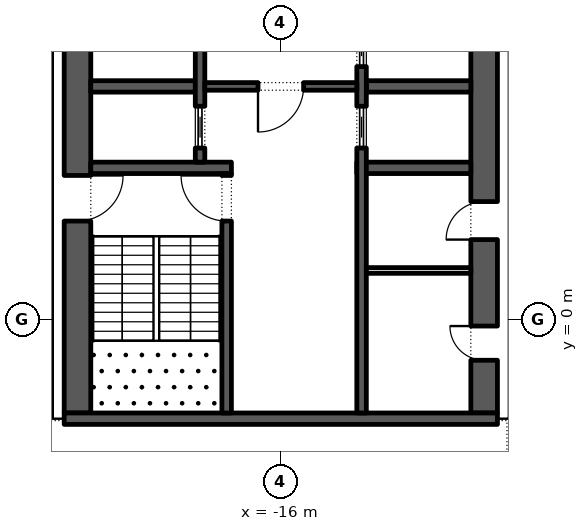
"""IFC4 building model, lengths in metres.
Left out: names, types, materials, properties, quantities, classifications, styles, units other than length and angle.
Written with IfcOpenShell. Run it as: python <this file> out.ifc"""

import sys

from ifc_helpers import new_model, si_unit, direction, frame, frame_2d, origin, place, context, subcontext, project, spatial, rectangle, extrude, element, fill, save


model = new_model("IFC4")
c1 = context("Model", 3, precision=1e-05, world=origin(), true_north=direction((0.0, 1.0)))
c2 = subcontext(c1, "Body", "Model", "MODEL_VIEW")
j1 = project(units=[si_unit("LENGTHUNIT", "METRE"), si_unit("PLANEANGLEUNIT", "RADIAN")], contexts=[c1])
p1 = place(None, origin())
s1 = spatial("IfcSite", under=j1, at=p1, CompositionType="ELEMENT")
p2 = place(p1, origin())
s2 = spatial("IfcBuilding", under=s1, at=p2, CompositionType="ELEMENT")
p3 = place(p2, frame((0.0, 0.0, 196.8)))
s3 = spatial("IfcBuildingStorey", under=s2, at=p3, CompositionType="ELEMENT", Elevation=196.8)
p4 = place(p3, frame((-33.157, 30.092, 0.0), z_axis=(0.0, 0.0, 1.0), x_axis=(0.224950279389, -0.974370243697, 0.0)))
e1 = element("IfcWall", 1, at=p4, inside=s3, PredefinedType="STANDARD", context=c2, shape_type="SweptSolid", body=[
    extrude(rectangle(XDim=49.5, YDim=0.3, at=frame_2d((24.75, 0.0))), origin(), (0.0, 0.0, 1.0), 4.0),
])
p5 = place(p4, frame((2.207, 0.0, 0.0)))
e2 = element("IfcOpeningElement", 2, at=p5, cuts=e1, PredefinedType="OPENING", context=c2, shape_type="SweptSolid", body=[
    extrude(rectangle(XDim=2.4, YDim=3.5, at=frame_2d((1.2, 1.75))), frame((0.0, 0.16, 0.0), z_axis=(0.0, -1.0, 0.0), x_axis=(1.0, 0.0, 0.0)), (0.0, 0.0, 1.0), 0.32),
])
p6 = place(p4, frame((8.121, 0.0, 0.45)))
e3 = element("IfcOpeningElement", 3, at=p6, cuts=e1, PredefinedType="OPENING", context=c2, shape_type="SweptSolid", body=[
    extrude(rectangle(XDim=4.5, YDim=2.825, at=frame_2d((2.25, 1.413))), frame((0.0, 0.16, 0.0), z_axis=(0.0, -1.0, 0.0), x_axis=(1.0, 0.0, 0.0)), (0.0, 0.0, 1.0), 0.32),
])
p7 = place(p4, frame((15.236, 0.0, 0.45)))
e4 = element("IfcOpeningElement", 4, at=p7, cuts=e1, PredefinedType="OPENING", context=c2, shape_type="SweptSolid", body=[
    extrude(rectangle(XDim=4.5, YDim=2.95, at=frame_2d((2.25, 1.475))), frame((0.0, 0.16, 0.0), z_axis=(0.0, -1.0, 0.0), x_axis=(1.0, 0.0, 0.0)), (0.0, 0.0, 1.0), 0.32),
])
p8 = place(p4, frame((22.35, 0.0, 0.45)))
e5 = element("IfcOpeningElement", 5, at=p8, cuts=e1, PredefinedType="OPENING", context=c2, shape_type="SweptSolid", body=[
    extrude(rectangle(XDim=4.5, YDim=3.0, at=frame_2d((2.25, 1.5))), frame((0.0, 0.16, 0.0), z_axis=(0.0, -1.0, 0.0), x_axis=(1.0, 0.0, 0.0)), (0.0, 0.0, 1.0), 0.32),
])
p9 = place(p4, frame((30.514, 0.0, 0.0)))
e6 = element("IfcOpeningElement", 6, at=p9, cuts=e1, PredefinedType="OPENING", context=c2, shape_type="SweptSolid", body=[
    extrude(rectangle(XDim=2.4, YDim=3.5, at=frame_2d((1.2, 1.75))), frame((0.0, 0.16, 0.0), z_axis=(0.0, -1.0, 0.0), x_axis=(1.0, 0.0, 0.0)), (0.0, 0.0, 1.0), 0.32),
])
p10 = place(p4, frame((36.579, 0.0, 0.45)))
e7 = element("IfcOpeningElement", 7, at=p10, cuts=e1, PredefinedType="OPENING", context=c2, shape_type="SweptSolid", body=[
    extrude(rectangle(XDim=4.5, YDim=3.05, at=frame_2d((2.25, 1.525))), frame((0.0, 0.16, 0.0), z_axis=(0.0, -1.0, 0.0), x_axis=(1.0, 0.0, 0.0)), (0.0, 0.0, 1.0), 0.32),
])
p11 = place(p4, frame((43.693, 0.0, 0.45)))
e8 = element("IfcOpeningElement", 8, at=p11, cuts=e1, PredefinedType="OPENING", context=c2, shape_type="SweptSolid", body=[
    extrude(rectangle(XDim=4.5, YDim=3.05, at=frame_2d((2.25, 1.525))), frame((0.0, 0.16, 0.0), z_axis=(0.0, -1.0, 0.0), x_axis=(1.0, 0.0, 0.0)), (0.0, 0.0, 1.0), 0.32),
])
p12 = place(p3, frame((-21.35, -2.45, 0.0), z_axis=(0.0, 0.0, 1.0), x_axis=(0.0, 1.0, 0.0)))
e9 = element("IfcWall", 9, at=p12, inside=s3, PredefinedType="SHEAR", context=c2, shape_type="SweptSolid", body=[
    extrude(rectangle(XDim=27.9, YDim=0.7, at=frame_2d((13.95, 0.0))), origin(), (0.0, 0.0, 1.0), 4.0),
])
p13 = place(p12, frame((5.05, 0.0, 0.0)))
e10 = element("IfcOpeningElement", 10, at=p13, cuts=e9, PredefinedType="OPENING", context=c2, shape_type="SweptSolid", body=[
    extrude(rectangle(XDim=1.2, YDim=2.1, at=frame_2d((0.6, 1.05))), frame((0.0, 0.36, 0.0), z_axis=(0.0, -1.0, 0.0), x_axis=(1.0, 0.0, 0.0)), (0.0, 0.0, 1.0), 0.72),
])
p14 = place(p12, frame((21.65, 0.0, 0.0)))
e11 = element("IfcOpeningElement", 11, at=p14, cuts=e9, PredefinedType="OPENING", context=c2, shape_type="SweptSolid", body=[
    extrude(rectangle(XDim=1.2, YDim=2.1, at=frame_2d((0.6, 1.05))), frame((0.0, 0.36, 0.0), z_axis=(0.0, -1.0, 0.0), x_axis=(1.0, 0.0, 0.0)), (0.0, 0.0, 1.0), 0.72),
])
p15 = place(p3, frame((-10.65, -2.45, 0.0), z_axis=(0.0, 0.0, 1.0), x_axis=(0.0, 1.0, 0.0)))
e12 = element("IfcWall", 12, at=p15, inside=s3, PredefinedType="SHEAR", context=c2, shape_type="SweptSolid", body=[
    extrude(rectangle(XDim=27.9, YDim=0.7, at=frame_2d((13.95, 0.0))), origin(), (0.0, 0.0, 1.0), 4.0),
])
p16 = place(p15, frame((23.65, 0.0, 0.0)))
e13 = element("IfcOpeningElement", 13, at=p16, cuts=e12, PredefinedType="OPENING", context=c2, shape_type="SweptSolid", body=[
    extrude(rectangle(XDim=2.4, YDim=2.1, at=frame_2d((1.2, 1.05))), frame((0.0, 0.36, 0.0), z_axis=(0.0, -1.0, 0.0), x_axis=(1.0, 0.0, 0.0)), (0.0, 0.0, 1.0), 0.72),
])
p17 = place(p15, frame((1.387, 0.0, 0.0)))
e14 = element("IfcOpeningElement", 14, at=p17, cuts=e12, PredefinedType="OPENING", context=c2, shape_type="SweptSolid", body=[
    extrude(rectangle(XDim=0.9, YDim=2.1, at=frame_2d((0.45, 1.05))), frame((0.0, 0.36, 0.0), z_axis=(0.0, -1.0, 0.0), x_axis=(1.0, 0.0, 0.0)), (0.0, 0.0, 1.0), 0.72),
])
p18 = place(p15, frame((4.562, 0.0, 0.0)))
e15 = element("IfcOpeningElement", 15, at=p18, cuts=e12, PredefinedType="OPENING", context=c2, shape_type="SweptSolid", body=[
    extrude(rectangle(XDim=1.0, YDim=2.1, at=frame_2d((0.5, 1.05))), frame((0.0, 0.36, 0.0), z_axis=(0.0, -1.0, 0.0), x_axis=(1.0, 0.0, 0.0)), (0.0, 0.0, 1.0), 0.72),
])
p19 = place(p3, frame((-21.7, -2.6, 0.0), z_axis=(0.0, 0.0, 1.0), x_axis=(1.0, 0.0, 0.0)))
e16 = element("IfcWall", 16, at=p19, inside=s3, PredefinedType="SHEAR", context=c2, shape_type="SweptSolid", body=[
    extrude(rectangle(XDim=11.4, YDim=0.3, at=frame_2d((5.7, 0.0))), origin(), (0.0, 0.0, 1.0), 4.0),
])
p20 = place(p3, frame((-21.0, 4.0, 0.0), z_axis=(0.0, 0.0, 1.0), x_axis=(1.0, 0.0, 0.0)))
e17 = element("IfcWall", 17, at=p20, inside=s3, PredefinedType="SHEAR", context=c2, shape_type="SweptSolid", body=[
    extrude(rectangle(XDim=3.7, YDim=0.3, at=frame_2d((1.85, 0.0))), origin(), (0.0, 0.0, 1.0), 4.0),
])
p21 = place(p3, frame((-17.425, -2.45, 0.0), z_axis=(0.0, 0.0, 1.0), x_axis=(0.0, 1.0, 0.0)))
e18 = element("IfcWall", 18, at=p21, inside=s3, PredefinedType="SHEAR", context=c2, shape_type="SweptSolid", body=[
    extrude(rectangle(XDim=6.3, YDim=0.25, at=frame_2d((3.15, 0.0))), origin(), (0.0, 0.0, 1.0), 4.0),
])
p22 = place(p21, frame((5.05, 0.0, 0.0)))
e19 = element("IfcOpeningElement", 19, at=p22, cuts=e18, PredefinedType="OPENING", context=c2, shape_type="SweptSolid", body=[
    extrude(rectangle(XDim=1.2, YDim=2.1, at=frame_2d((0.6, 1.05))), frame((0.0, 0.135, 0.0), z_axis=(0.0, -1.0, 0.0), x_axis=(1.0, 0.0, 0.0)), (0.0, 0.0, 1.0), 0.27),
])
p23 = place(p3, frame((-21.0, 6.143, 0.0), z_axis=(0.0, 0.0, 1.0), x_axis=(1.0, 0.0, 0.0)))
e20 = element("IfcWall", 20, at=p23, inside=s3, PredefinedType="SHEAR", context=c2, shape_type="SweptSolid", body=[
    extrude(rectangle(XDim=2.75, YDim=0.3, at=frame_2d((1.375, 0.0))), origin(), (0.0, 0.0, 1.0), 4.0),
])
p24 = place(p3, frame((-18.125, 4.15, 0.0), z_axis=(0.0, 0.0, 1.0), x_axis=(0.0, 1.0, 0.0)))
e21 = element("IfcWall", 21, at=p24, inside=s3, PredefinedType="SHEAR", context=c2, shape_type="SweptSolid", body=[
    extrude(rectangle(XDim=14.7, YDim=0.25, at=frame_2d((7.35, 0.0))), origin(), (0.0, 0.0, 1.0), 4.0),
])
p25 = place(p24, frame((3.446, 0.0, 0.0)))
e22 = element("IfcOpeningElement", 22, at=p25, cuts=e21, PredefinedType="OPENING", context=c2, shape_type="SweptSolid", body=[
    extrude(rectangle(XDim=0.9, YDim=2.1, at=frame_2d((0.45, 1.05))), frame((0.0, 0.135, 0.0), z_axis=(0.0, -1.0, 0.0), x_axis=(1.0, 0.0, 0.0)), (0.0, 0.0, 1.0), 0.27),
])
p26 = place(p24, frame((6.9, 0.0, 0.0)))
e23 = element("IfcOpeningElement", 23, at=p26, cuts=e21, PredefinedType="OPENING", context=c2, shape_type="SweptSolid", body=[
    extrude(rectangle(XDim=0.9, YDim=2.1, at=frame_2d((0.45, 1.05))), frame((0.0, 0.135, 0.0), z_axis=(0.0, -1.0, 0.0), x_axis=(1.0, 0.0, 0.0)), (0.0, 0.0, 1.0), 0.27),
])
p27 = place(p24, frame((10.354, 0.0, 0.0)))
e24 = element("IfcOpeningElement", 24, at=p27, cuts=e21, PredefinedType="OPENING", context=c2, shape_type="SweptSolid", body=[
    extrude(rectangle(XDim=0.9, YDim=2.1, at=frame_2d((0.45, 1.05))), frame((0.0, 0.135, 0.0), z_axis=(0.0, -1.0, 0.0), x_axis=(1.0, 0.0, 0.0)), (0.0, 0.0, 1.0), 0.27),
])
p28 = place(p24, frame((0.371, 0.0, 0.0)))
e25 = element("IfcOpeningElement", 25, at=p28, cuts=e21, PredefinedType="OPENING", context=c2, shape_type="SweptSolid", body=[
    extrude(rectangle(XDim=1.1, YDim=2.1, at=frame_2d((0.55, 1.05))), frame((0.0, 0.135, 0.0), z_axis=(0.0, -1.0, 0.0), x_axis=(1.0, 0.0, 0.0)), (0.0, 0.0, 1.0), 0.27),
])
p29 = place(p24, frame((13.229, 0.0, 0.0)))
e26 = element("IfcOpeningElement", 26, at=p29, cuts=e21, PredefinedType="OPENING", context=c2, shape_type="SweptSolid", body=[
    extrude(rectangle(XDim=1.1, YDim=2.1, at=frame_2d((0.55, 1.05))), frame((0.0, 0.135, 0.0), z_axis=(0.0, -1.0, 0.0), x_axis=(1.0, 0.0, 0.0)), (0.0, 0.0, 1.0), 0.27),
])
p30 = place(p3, frame((-14.0, 4.0, 0.0), z_axis=(0.0, 0.0, 1.0), x_axis=(1.0, 0.0, 0.0)))
e27 = element("IfcWall", 27, at=p30, inside=s3, PredefinedType="SHEAR", context=c2, shape_type="SweptSolid", body=[
    extrude(rectangle(XDim=3.0, YDim=0.3, at=frame_2d((1.5, 0.0))), origin(), (0.0, 0.0, 1.0), 4.0),
])
p31 = place(p3, frame((-13.75, 6.143, 0.0), z_axis=(0.0, 0.0, 1.0), x_axis=(1.0, 0.0, 0.0)))
e28 = element("IfcWall", 28, at=p31, inside=s3, PredefinedType="SHEAR", context=c2, shape_type="SweptSolid", body=[
    extrude(rectangle(XDim=2.75, YDim=0.3, at=frame_2d((1.375, 0.0))), origin(), (0.0, 0.0, 1.0), 4.0),
])
p32 = place(p3, frame((-13.875, -2.45, 0.0), z_axis=(0.0, 0.0, 1.0), x_axis=(0.0, 1.0, 0.0)))
e29 = element("IfcWall", 29, at=p32, inside=s3, PredefinedType="SHEAR", context=c2, shape_type="SweptSolid", body=[
    extrude(rectangle(XDim=21.3, YDim=0.25, at=frame_2d((10.65, 0.0))), origin(), (0.0, 0.0, 1.0), 4.0),
])
p33 = place(p32, frame((17.786, 0.0, 0.0)))
e30 = element("IfcOpeningElement", 30, at=p33, cuts=e29, PredefinedType="OPENING", context=c2, shape_type="SweptSolid", body=[
    extrude(rectangle(XDim=0.9, YDim=2.1, at=frame_2d((0.45, 1.05))), frame((0.0, 0.135, 0.0), z_axis=(0.0, -1.0, 0.0), x_axis=(1.0, 0.0, 0.0)), (0.0, 0.0, 1.0), 0.27),
])
p34 = place(p32, frame((6.971, 0.0, 0.0)))
e31 = element("IfcOpeningElement", 31, at=p34, cuts=e29, PredefinedType="OPENING", context=c2, shape_type="SweptSolid", body=[
    extrude(rectangle(XDim=1.1, YDim=2.1, at=frame_2d((0.55, 1.05))), frame((0.0, 0.135, 0.0), z_axis=(0.0, -1.0, 0.0), x_axis=(1.0, 0.0, 0.0)), (0.0, 0.0, 1.0), 0.27),
])
p35 = place(p32, frame((9.114, 0.0, 0.0)))
e32 = element("IfcOpeningElement", 32, at=p35, cuts=e29, PredefinedType="OPENING", context=c2, shape_type="SweptSolid", body=[
    extrude(rectangle(XDim=1.1, YDim=2.1, at=frame_2d((0.55, 1.05))), frame((0.0, 0.135, 0.0), z_axis=(0.0, -1.0, 0.0), x_axis=(1.0, 0.0, 0.0)), (0.0, 0.0, 1.0), 0.27),
])
p36 = place(p32, frame((11.257, 0.0, 0.0)))
e33 = element("IfcOpeningElement", 33, at=p36, cuts=e29, PredefinedType="OPENING", context=c2, shape_type="SweptSolid", body=[
    extrude(rectangle(XDim=1.1, YDim=2.1, at=frame_2d((0.55, 1.05))), frame((0.0, 0.135, 0.0), z_axis=(0.0, -1.0, 0.0), x_axis=(1.0, 0.0, 0.0)), (0.0, 0.0, 1.0), 0.27),
])
p37 = place(p32, frame((13.4, 0.0, 0.0)))
e34 = element("IfcOpeningElement", 34, at=p37, cuts=e29, PredefinedType="OPENING", context=c2, shape_type="SweptSolid", body=[
    extrude(rectangle(XDim=1.1, YDim=2.1, at=frame_2d((0.55, 1.05))), frame((0.0, 0.135, 0.0), z_axis=(0.0, -1.0, 0.0), x_axis=(1.0, 0.0, 0.0)), (0.0, 0.0, 1.0), 0.27),
])
p38 = place(p3, frame((-18.0, 6.143, 0.0), z_axis=(0.0, 0.0, 1.0), x_axis=(1.0, 0.0, 0.0)))
e35 = element("IfcWall", 35, at=p38, inside=s3, PredefinedType="SHEAR", context=c2, shape_type="SweptSolid", body=[
    extrude(rectangle(XDim=4.0, YDim=0.2, at=frame_2d((2.0, 0.0))), origin(), (0.0, 0.0, 1.0), 4.0),
])
p39 = place(p38, frame((1.4, 0.0, 0.0)))
e36 = element("IfcOpeningElement", 36, at=p39, cuts=e35, PredefinedType="OPENING", context=c2, shape_type="SweptSolid", body=[
    extrude(rectangle(XDim=1.2, YDim=2.1, at=frame_2d((0.6, 1.05))), frame((0.0, 0.11, 0.0), z_axis=(0.0, -1.0, 0.0), x_axis=(1.0, 0.0, 0.0)), (0.0, 0.0, 1.0), 0.22),
])
p40 = place(p3, frame((-13.75, 1.3, 0.0), z_axis=(0.0, 0.0, 1.0), x_axis=(1.0, 0.0, 0.0)))
e37 = element("IfcWall", 37, at=p40, inside=s3, PredefinedType="PARTITIONING", context=c2, shape_type="SweptSolid", body=[
    extrude(rectangle(XDim=2.75, YDim=0.15, at=frame_2d((1.375, 0.0))), origin(), (0.0, 0.0, 1.0), 4.0),
])
p41 = place(p28, origin())
e38 = element("IfcDoor", 38, at=p41, inside=s3, OperationType="SLIDING_TO_LEFT", PredefinedType="DOOR", context=c2, shape_type="SweptSolid", body=[
    extrude(rectangle(XDim=1.1, YDim=2.1, at=frame_2d((0.55, 1.05))), frame((0.0, 0.025, 0.0), z_axis=(0.0, -1.0, 0.0), x_axis=(1.0, 0.0, 0.0)), (0.0, 0.0, 1.0), 0.05),
])
fill(e25, e38)
p42 = place(p34, origin())
e39 = element("IfcDoor", 39, at=p42, inside=s3, OperationType="SLIDING_TO_LEFT", PredefinedType="DOOR", context=c2, shape_type="SweptSolid", body=[
    extrude(rectangle(XDim=1.1, YDim=2.1, at=frame_2d((0.55, 1.05))), frame((0.0, 0.025, 0.0), z_axis=(0.0, -1.0, 0.0), x_axis=(1.0, 0.0, 0.0)), (0.0, 0.0, 1.0), 0.05),
])
fill(e31, e39)
p43 = place(p35, origin())
e40 = element("IfcDoor", 40, at=p43, inside=s3, OperationType="SLIDING_TO_LEFT", PredefinedType="DOOR", context=c2, shape_type="SweptSolid", body=[
    extrude(rectangle(XDim=1.1, YDim=2.1, at=frame_2d((0.55, 1.05))), frame((0.0, 0.025, 0.0), z_axis=(0.0, -1.0, 0.0), x_axis=(1.0, 0.0, 0.0)), (0.0, 0.0, 1.0), 0.05),
])
fill(e32, e40)
p44 = place(p39, frame((1.2, 0.0, 0.0), z_axis=(0.0, 0.0, 1.0), x_axis=(-1.0, 0.0, 0.0)))
e41 = element("IfcDoor", 41, at=p44, inside=s3, OperationType="SINGLE_SWING_LEFT", PredefinedType="DOOR", context=c2, shape_type="SweptSolid", body=[
    extrude(rectangle(XDim=1.2, YDim=2.1, at=frame_2d((0.6, 1.05))), frame((0.0, 0.025, 0.0), z_axis=(0.0, -1.0, 0.0), x_axis=(1.0, 0.0, 0.0)), (0.0, 0.0, 1.0), 0.05),
])
fill(e36, e41)
p45 = place(p22, origin())
e42 = element("IfcDoor", 42, at=p45, inside=s3, OperationType="SINGLE_SWING_LEFT", PredefinedType="DOOR", context=c2, shape_type="SweptSolid", body=[
    extrude(rectangle(XDim=1.2, YDim=2.1, at=frame_2d((0.6, 1.05))), frame((0.0, 0.025, 0.0), z_axis=(0.0, -1.0, 0.0), x_axis=(1.0, 0.0, 0.0)), (0.0, 0.0, 1.0), 0.05),
])
fill(e19, e42)
p46 = place(p13, frame((1.2, 0.0, 0.0), z_axis=(0.0, 0.0, 1.0), x_axis=(-1.0, 0.0, 0.0)))
e43 = element("IfcDoor", 43, at=p46, inside=s3, OperationType="SINGLE_SWING_RIGHT", PredefinedType="DOOR", context=c2, shape_type="SweptSolid", body=[
    extrude(rectangle(XDim=1.2, YDim=2.1, at=frame_2d((0.6, 1.05))), frame((0.0, 0.025, 0.0), z_axis=(0.0, -1.0, 0.0), x_axis=(1.0, 0.0, 0.0)), (0.0, 0.0, 1.0), 0.05),
])
fill(e10, e43)
p47 = place(p17, origin())
e44 = element("IfcDoor", 44, at=p47, inside=s3, OperationType="SINGLE_SWING_LEFT", PredefinedType="DOOR", context=c2, shape_type="SweptSolid", body=[
    extrude(rectangle(XDim=0.9, YDim=2.1, at=frame_2d((0.45, 1.05))), frame((0.0, 0.35, 0.0), z_axis=(0.0, -1.0, 0.0), x_axis=(1.0, 0.0, 0.0)), (0.0, 0.0, 1.0), 0.05),
])
fill(e14, e44)
p48 = place(p18, origin())
e45 = element("IfcDoor", 45, at=p48, inside=s3, OperationType="SINGLE_SWING_RIGHT", PredefinedType="DOOR", context=c2, shape_type="SweptSolid", body=[
    extrude(rectangle(XDim=1.0, YDim=2.1, at=frame_2d((0.5, 1.05))), frame((0.0, 0.35, 0.0), z_axis=(0.0, -1.0, 0.0), x_axis=(1.0, 0.0, 0.0)), (0.0, 0.0, 1.0), 0.05),
])
fill(e15, e45)
save(model, sys.argv[1])
